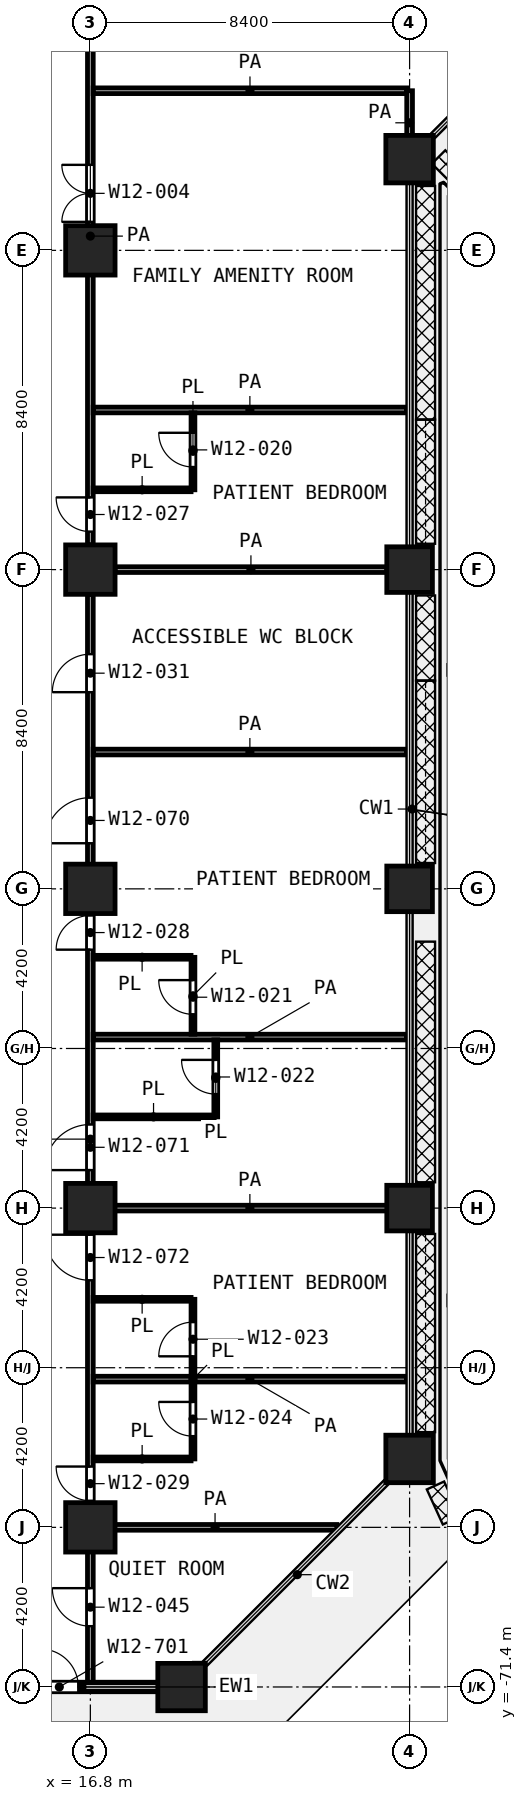
"""IFC4 building model, lengths in metres.
Left out: names, types, materials, properties, quantities, classifications, styles, units other than length and angle.
Written with IfcOpenShell. Run it as: python <this file> out.ifc"""

import sys

from ifc_helpers import new_model, si_unit, direction, frame, frame_2d, origin, origin_2d, place, context, subcontext, project, spatial, rectangle, extrude, element, fill, save


model = new_model("IFC4")
c1 = context("Model", 3, precision=1e-05, world=origin(), true_north=direction((0.0, 1.0)))
c2 = subcontext(c1, "Body", "Model", "MODEL_VIEW")
j1 = project(units=[si_unit("LENGTHUNIT", "METRE"), si_unit("PLANEANGLEUNIT", "RADIAN")], contexts=[c1])
p1 = place(None, origin())
s1 = spatial("IfcSite", under=j1, at=p1, CompositionType="ELEMENT")
p2 = place(p1, origin())
s2 = spatial("IfcBuilding", under=s1, at=p2, CompositionType="ELEMENT")
p3 = place(p2, frame((0.0, 0.0, 77.0)))
s3 = spatial("IfcBuildingStorey", under=s2, at=p3, CompositionType="ELEMENT", Elevation=77.0)
p4 = place(p3, frame((25.2, -31.2, 0.0), z_axis=(0.0, 0.0, 1.0), x_axis=(1.0, 0.0, 0.0)))
e1 = element("IfcColumn", 1, at=p4, inside=s3, PredefinedType="COLUMN", context=c2, shape_type="SweptSolid", body=[
    extrude(rectangle(XDim=1.25, YDim=1.25, at=origin_2d()), origin(), (0.0, 0.0, 1.0), 4.2),
])
for number, where, z_axis, x_axis in (
    (2, (16.8, -33.6, 0.0), (0.0, 0.0, 1.0), (1.0, 0.0, 0.0)),
    (3, (16.8, -42.0, 0.0), (0.0, 0.0, 1.0), (1.0, 0.0, 0.0)),
):
    element("IfcColumn", number, at=place(p3, frame(where, z_axis=z_axis, x_axis=x_axis)), inside=s3, PredefinedType="COLUMN", context=c2, shape_type="SweptSolid", body=[
        extrude(rectangle(XDim=1.3, YDim=1.3, at=origin_2d()), origin(), (0.0, 0.0, 1.0), 4.2),
    ])
p5 = place(p3, frame((25.2, -42.0, 0.0), z_axis=(0.0, 0.0, 1.0), x_axis=(1.0, 0.0, 0.0)))
e4 = element("IfcColumn", 4, at=p5, inside=s3, PredefinedType="COLUMN", context=c2, shape_type="SweptSolid", body=[
    extrude(rectangle(XDim=1.2, YDim=1.2, at=origin_2d()), origin(), (0.0, 0.0, 1.0), 4.2),
])
p6 = place(p3, frame((16.8, -50.4, 0.0), z_axis=(0.0, 0.0, 1.0), x_axis=(1.0, 0.0, 0.0)))
e5 = element("IfcColumn", 5, at=p6, inside=s3, PredefinedType="COLUMN", context=c2, shape_type="SweptSolid", body=[
    extrude(rectangle(XDim=1.3, YDim=1.3, at=origin_2d()), origin(), (0.0, 0.0, 1.0), 4.2),
])
p7 = place(p3, frame((25.2, -50.4, 0.0), z_axis=(0.0, 0.0, 1.0), x_axis=(1.0, 0.0, 0.0)))
e6 = element("IfcColumn", 6, at=p7, inside=s3, PredefinedType="COLUMN", context=c2, shape_type="SweptSolid", body=[
    extrude(rectangle(XDim=1.2, YDim=1.2, at=origin_2d()), origin(), (0.0, 0.0, 1.0), 4.2),
])
p8 = place(p3, frame((16.8, -58.8, 0.0), z_axis=(0.0, 0.0, 1.0), x_axis=(1.0, 0.0, 0.0)))
e7 = element("IfcColumn", 7, at=p8, inside=s3, PredefinedType="COLUMN", context=c2, shape_type="SweptSolid", body=[
    extrude(rectangle(XDim=1.3, YDim=1.3, at=origin_2d()), origin(), (0.0, 0.0, 1.0), 4.2),
])
p9 = place(p3, frame((25.2, -58.8, 0.0), z_axis=(0.0, 0.0, 1.0), x_axis=(1.0, 0.0, 0.0)))
e8 = element("IfcColumn", 8, at=p9, inside=s3, PredefinedType="COLUMN", context=c2, shape_type="SweptSolid", body=[
    extrude(rectangle(XDim=1.2, YDim=1.2, at=origin_2d()), origin(), (0.0, 0.0, 1.0), 4.2),
])
p10 = place(p3, frame((25.2, -65.4, 0.0), z_axis=(0.0, 0.0, 1.0), x_axis=(1.0, 0.0, 0.0)))
e9 = element("IfcColumn", 9, at=p10, inside=s3, PredefinedType="COLUMN", context=c2, shape_type="SweptSolid", body=[
    extrude(rectangle(XDim=1.25, YDim=1.25, at=origin_2d()), origin(), (0.0, 0.0, 1.0), 4.2),
])
p11 = place(p3, frame((16.8, -67.2, 0.0), z_axis=(0.0, 0.0, 1.0), x_axis=(1.0, 0.0, 0.0)))
e10 = element("IfcColumn", 10, at=p11, inside=s3, PredefinedType="COLUMN", context=c2, shape_type="SweptSolid", body=[
    extrude(rectangle(XDim=1.3, YDim=1.3, at=origin_2d()), origin(), (0.0, 0.0, 1.0), 4.2),
])
p12 = place(p3, frame((19.2, -71.4, 0.0), z_axis=(0.0, 0.0, 1.0), x_axis=(1.0, 0.0, 0.0)))
e11 = element("IfcColumn", 11, at=p12, inside=s3, PredefinedType="COLUMN", context=c2, shape_type="SweptSolid", body=[
    extrude(rectangle(XDim=1.25, YDim=1.25, at=origin_2d()), origin(), (0.0, 0.0, 1.0), 4.2),
])
p13 = place(p3, frame((14.592, -71.4, 0.0), z_axis=(0.0, 0.0, 1.0), x_axis=(1.0, 0.0, 0.0)))
e12 = element("IfcWall", 12, at=p13, inside=s3, PredefinedType="SOLIDWALL", context=c2, shape_type="SweptSolid", body=[
    extrude(rectangle(XDim=3.983, YDim=0.25, at=frame_2d((1.992, 0.0))), origin(), (0.0, 0.0, 1.0), 3.78),
])
p14 = place(p13, frame((0.892, 0.0, 0.0)))
e13 = element("IfcOpeningElement", 13, at=p14, cuts=e12, PredefinedType="OPENING", context=c2, shape_type="SweptSolid", body=[
    extrude(rectangle(XDim=1.0, YDim=2.1, at=frame_2d((0.5, 1.05))), frame((0.0, 0.135, 0.0), z_axis=(0.0, -1.0, 0.0), x_axis=(1.0, 0.0, 0.0)), (0.0, 0.0, 1.0), 0.27),
])
for number, where, z_axis, x_axis in (
    (14, (16.875, -65.4, 0.0), (0.0, 0.0, 1.0), (1.0, 0.0, 0.0)),
    (15, (16.875, -61.2, 0.0), (0.0, 0.0, 1.0), (1.0, 0.0, 0.0)),
):
    element("IfcWall", number, at=place(p3, frame(where, z_axis=z_axis, x_axis=x_axis)), inside=s3, PredefinedType="PARTITIONING", context=c2, shape_type="SweptSolid", body=[
        extrude(rectangle(XDim=2.575, YDim=0.1, at=frame_2d((1.288, 0.0))), origin(), (0.0, 0.0, 1.0), 3.9),
    ])
p15 = place(p3, frame((16.875, -56.4, 0.0), z_axis=(0.0, 0.0, 1.0), x_axis=(1.0, 0.0, 0.0)))
e16 = element("IfcWall", 16, at=p15, inside=s3, PredefinedType="PARTITIONING", context=c2, shape_type="SweptSolid", body=[
    extrude(rectangle(XDim=3.175, YDim=0.1, at=frame_2d((1.587, 0.0))), origin(), (0.0, 0.0, 1.0), 3.9),
])
p16 = place(p3, frame((16.875, -52.2, 0.0), z_axis=(0.0, 0.0, 1.0), x_axis=(1.0, 0.0, 0.0)))
e17 = element("IfcWall", 17, at=p16, inside=s3, PredefinedType="PARTITIONING", context=c2, shape_type="SweptSolid", body=[
    extrude(rectangle(XDim=2.574, YDim=0.1, at=frame_2d((1.287, 0.0))), origin(), (0.0, 0.0, 1.0), 3.9),
])
p17 = place(p3, frame((16.875, -39.9, 0.0), z_axis=(0.0, 0.0, 1.0), x_axis=(1.0, 0.0, 0.0)))
e18 = element("IfcWall", 18, at=p17, inside=s3, PredefinedType="PARTITIONING", context=c2, shape_type="SweptSolid", body=[
    extrude(rectangle(XDim=2.575, YDim=0.1, at=frame_2d((1.288, 0.0))), origin(), (0.0, 0.0, 1.0), 3.9),
])
p18 = place(p3, frame((19.5, -65.4, 0.0), z_axis=(0.0, 0.0, 1.0), x_axis=(0.0, 1.0, 0.0)))
e19 = element("IfcWall", 19, at=p18, inside=s3, PredefinedType="PARTITIONING", context=c2, shape_type="SweptSolid", body=[
    extrude(rectangle(XDim=4.2, YDim=0.1, at=frame_2d((2.1, 0.0))), origin(), (0.0, 0.0, 1.0), 3.9),
])
p19 = place(p18, frame((2.7, 0.0, 0.0)))
e20 = element("IfcOpeningElement", 20, at=p19, cuts=e19, PredefinedType="OPENING", context=c2, shape_type="SweptSolid", body=[
    extrude(rectangle(XDim=0.9, YDim=2.1, at=frame_2d((0.45, 1.05))), frame((0.0, 0.06, 0.0), z_axis=(0.0, -1.0, 0.0), x_axis=(1.0, 0.0, 0.0)), (0.0, 0.0, 1.0), 0.12),
])
p20 = place(p18, frame((0.6, 0.0, 0.0)))
e21 = element("IfcOpeningElement", 21, at=p20, cuts=e19, PredefinedType="OPENING", context=c2, shape_type="SweptSolid", body=[
    extrude(rectangle(XDim=0.9, YDim=2.1, at=frame_2d((0.45, 1.05))), frame((0.0, 0.06, 0.0), z_axis=(0.0, -1.0, 0.0), x_axis=(1.0, 0.0, 0.0)), (0.0, 0.0, 1.0), 0.12),
])
p21 = place(p3, frame((19.5, -54.225, 0.0), z_axis=(0.0, 0.0, 1.0), x_axis=(0.0, 1.0, 0.0)))
e22 = element("IfcWall", 22, at=p21, inside=s3, PredefinedType="PARTITIONING", context=c2, shape_type="SweptSolid", body=[
    extrude(rectangle(XDim=2.023, YDim=0.1, at=frame_2d((1.012, 0.0))), origin(), (0.0, 0.0, 1.0), 3.9),
])
p22 = place(p21, frame((0.524, 0.0, 0.0)))
e23 = element("IfcOpeningElement", 23, at=p22, cuts=e22, PredefinedType="OPENING", context=c2, shape_type="SweptSolid", body=[
    extrude(rectangle(XDim=0.9, YDim=2.1, at=frame_2d((0.45, 1.05))), frame((0.0, 0.06, 0.0), z_axis=(0.0, -1.0, 0.0), x_axis=(1.0, 0.0, 0.0)), (0.0, 0.0, 1.0), 0.12),
])
p23 = place(p3, frame((19.5, -39.9, 0.0), z_axis=(0.0, 0.0, 1.0), x_axis=(0.0, 1.0, 0.0)))
e24 = element("IfcWall", 24, at=p23, inside=s3, PredefinedType="PARTITIONING", context=c2, shape_type="SweptSolid", body=[
    extrude(rectangle(XDim=2.025, YDim=0.1, at=frame_2d((1.012, 0.0))), origin(), (0.0, 0.0, 1.0), 3.9),
])
p24 = place(p23, frame((0.6, 0.0, 0.0)))
e25 = element("IfcOpeningElement", 25, at=p24, cuts=e24, PredefinedType="OPENING", context=c2, shape_type="SweptSolid", body=[
    extrude(rectangle(XDim=0.9, YDim=2.1, at=frame_2d((0.45, 1.05))), frame((0.0, 0.06, 0.0), z_axis=(0.0, -1.0, 0.0), x_axis=(1.0, 0.0, 0.0)), (0.0, 0.0, 1.0), 0.12),
])
p25 = place(p3, frame((20.1, -56.4, 0.0), z_axis=(0.0, 0.0, 1.0), x_axis=(0.0, 1.0, 0.0)))
e26 = element("IfcWall", 26, at=p25, inside=s3, PredefinedType="PARTITIONING", context=c2, shape_type="SweptSolid", body=[
    extrude(rectangle(XDim=2.025, YDim=0.1, at=frame_2d((1.012, 0.0))), origin(), (0.0, 0.0, 1.0), 3.9),
])
p26 = place(p25, frame((0.6, 0.0, 0.0)))
e27 = element("IfcOpeningElement", 27, at=p26, cuts=e26, PredefinedType="OPENING", context=c2, shape_type="SweptSolid", body=[
    extrude(rectangle(XDim=0.9, YDim=2.1, at=frame_2d((0.45, 1.05))), frame((0.0, 0.06, 0.0), z_axis=(0.0, -1.0, 0.0), x_axis=(1.0, 0.0, 0.0)), (0.0, 0.0, 1.0), 0.12),
])
p27 = place(p3, frame((16.875, -67.2, 0.0), z_axis=(0.0, 0.0, 1.0), x_axis=(1.0, 0.0, 0.0)))
e28 = element("IfcWall", 28, at=p27, inside=s3, PredefinedType="PARTITIONING", context=c2, shape_type="SweptSolid", body=[
    extrude(rectangle(XDim=6.412, YDim=0.15, at=frame_2d((3.206, 0.0))), origin(), (0.0, 0.0, 1.0), 3.9),
])
for number, where, z_axis, x_axis in (
    (29, (16.875, -63.3, 0.0), (0.0, 0.0, 1.0), (1.0, 0.0, 0.0)),
    (30, (16.875, -58.8, 0.0), (0.0, 0.0, 1.0), (1.0, 0.0, 0.0)),
    (31, (16.875, -54.3, 0.0), (0.0, 0.0, 1.0), (1.0, 0.0, 0.0)),
    (32, (16.875, -46.8, 0.0), (0.0, 0.0, 1.0), (1.0, 0.0, 0.0)),
):
    element("IfcWall", number, at=place(p3, frame(where, z_axis=z_axis, x_axis=x_axis)), inside=s3, PredefinedType="PARTITIONING", context=c2, shape_type="SweptSolid", body=[
        extrude(rectangle(XDim=8.245, YDim=0.15, at=frame_2d((4.123, 0.0))), origin(), (0.0, 0.0, 1.0), 3.9),
    ])
p28 = place(p3, frame((17.45, -42.0, 0.0), z_axis=(0.0, 0.0, 1.0), x_axis=(1.0, 0.0, 0.0)))
e33 = element("IfcWall", 33, at=p28, inside=s3, PredefinedType="PARTITIONING", context=c2, shape_type="SweptSolid", body=[
    extrude(rectangle(XDim=7.15, YDim=0.15, at=frame_2d((3.575, 0.0))), origin(), (0.0, 0.0, 1.0), 3.9),
])
p29 = place(p3, frame((16.875, -37.8, 0.0), z_axis=(0.0, 0.0, 1.0), x_axis=(1.0, 0.0, 0.0)))
e34 = element("IfcWall", 34, at=p29, inside=s3, PredefinedType="PARTITIONING", context=c2, shape_type="SweptSolid", body=[
    extrude(rectangle(XDim=8.245, YDim=0.15, at=frame_2d((4.123, 0.0))), origin(), (0.0, 0.0, 1.0), 3.9),
])
p30 = place(p3, frame((16.875, -29.4, 0.0), z_axis=(0.0, 0.0, 1.0), x_axis=(1.0, 0.0, 0.0)))
e35 = element("IfcWall", 35, at=p30, inside=s3, PredefinedType="PARTITIONING", context=c2, shape_type="SweptSolid", body=[
    extrude(rectangle(XDim=8.25, YDim=0.15, at=frame_2d((4.125, 0.0))), origin(), (0.0, 0.0, 1.0), 3.9),
])
p31 = place(p3, frame((16.8, -71.32, 0.0), z_axis=(0.0, 0.0, 1.0), x_axis=(0.0, 1.0, 0.0)))
e36 = element("IfcWall", 36, at=p31, inside=s3, PredefinedType="PARTITIONING", context=c2, shape_type="SweptSolid", body=[
    extrude(rectangle(XDim=28.67, YDim=0.15, at=frame_2d((14.335, 0.0))), origin(), (0.0, 0.0, 1.0), 3.9),
])
p32 = place(p31, frame((26.095, 0.0, 0.0)))
e37 = element("IfcOpeningElement", 37, at=p32, cuts=e36, PredefinedType="OPENING", context=c2, shape_type="SweptSolid", body=[
    extrude(rectangle(XDim=1.0, YDim=2.1, at=frame_2d((0.5, 1.05))), frame((0.0, 0.085, 0.0), z_axis=(0.0, -1.0, 0.0), x_axis=(1.0, 0.0, 0.0)), (0.0, 0.0, 1.0), 0.17),
])
p33 = place(p31, frame((22.12, 0.0, 0.0)))
e38 = element("IfcOpeningElement", 38, at=p33, cuts=e36, PredefinedType="OPENING", context=c2, shape_type="SweptSolid", body=[
    extrude(rectangle(XDim=1.2, YDim=2.1, at=frame_2d((0.6, 1.05))), frame((0.0, 0.085, 0.0), z_axis=(0.0, -1.0, 0.0), x_axis=(1.0, 0.0, 0.0)), (0.0, 0.0, 1.0), 0.17),
])
p34 = place(p31, frame((19.32, 0.0, 0.0)))
e39 = element("IfcOpeningElement", 39, at=p34, cuts=e36, PredefinedType="OPENING", context=c2, shape_type="SweptSolid", body=[
    extrude(rectangle(XDim=0.9, YDim=2.1, at=frame_2d((0.45, 1.05))), frame((0.0, 0.085, 0.0), z_axis=(0.0, -1.0, 0.0), x_axis=(1.0, 0.0, 0.0)), (0.0, 0.0, 1.0), 0.17),
])
p35 = place(p31, frame((13.52, 0.0, 0.0)))
e40 = element("IfcOpeningElement", 40, at=p35, cuts=e36, PredefinedType="OPENING", context=c2, shape_type="SweptSolid", body=[
    extrude(rectangle(XDim=1.2, YDim=2.1, at=frame_2d((0.6, 1.05))), frame((0.0, 0.085, 0.0), z_axis=(0.0, -1.0, 0.0), x_axis=(1.0, 0.0, 0.0)), (0.0, 0.0, 1.0), 0.17),
])
p36 = place(p31, frame((10.62, 0.0, 0.0)))
e41 = element("IfcOpeningElement", 41, at=p36, cuts=e36, PredefinedType="OPENING", context=c2, shape_type="SweptSolid", body=[
    extrude(rectangle(XDim=1.2, YDim=2.1, at=frame_2d((0.6, 1.05))), frame((0.0, 0.085, 0.0), z_axis=(0.0, -1.0, 0.0), x_axis=(1.0, 0.0, 0.0)), (0.0, 0.0, 1.0), 0.17),
])
p37 = place(p31, frame((4.82, 0.0, 0.0)))
e42 = element("IfcOpeningElement", 42, at=p37, cuts=e36, PredefinedType="OPENING", context=c2, shape_type="SweptSolid", body=[
    extrude(rectangle(XDim=0.9, YDim=2.1, at=frame_2d((0.45, 1.05))), frame((0.0, 0.085, 0.0), z_axis=(0.0, -1.0, 0.0), x_axis=(1.0, 0.0, 0.0)), (0.0, 0.0, 1.0), 0.17),
])
p38 = place(p31, frame((1.52, 0.0, 0.0)))
e43 = element("IfcOpeningElement", 43, at=p38, cuts=e36, PredefinedType="OPENING", context=c2, shape_type="SweptSolid", body=[
    extrude(rectangle(XDim=1.0, YDim=2.1, at=frame_2d((0.5, 1.05))), frame((0.0, 0.085, 0.0), z_axis=(0.0, -1.0, 0.0), x_axis=(1.0, 0.0, 0.0)), (0.0, 0.0, 1.0), 0.17),
])
p39 = place(p3, frame((16.8, -41.35, 0.0), z_axis=(0.0, 0.0, 1.0), x_axis=(0.0, 1.0, 0.0)))
e44 = element("IfcWall", 44, at=p39, inside=s3, PredefinedType="PARTITIONING", context=c2, shape_type="SweptSolid", body=[
    extrude(rectangle(XDim=16.25, YDim=0.15, at=frame_2d((8.125, 0.0))), origin(), (0.0, 0.0, 1.0), 3.9),
])
p40 = place(p39, frame((8.5, 0.0, 0.0)))
e45 = element("IfcOpeningElement", 45, at=p40, cuts=e44, PredefinedType="OPENING", context=c2, shape_type="SweptSolid", body=[
    extrude(rectangle(XDim=1.5, YDim=2.1, at=frame_2d((0.75, 1.05))), frame((0.0, 0.085, 0.0), z_axis=(0.0, -1.0, 0.0), x_axis=(1.0, 0.0, 0.0)), (0.0, 0.0, 1.0), 0.17),
])
p41 = place(p39, frame((0.35, 0.0, 0.0)))
e46 = element("IfcOpeningElement", 46, at=p41, cuts=e44, PredefinedType="OPENING", context=c2, shape_type="SweptSolid", body=[
    extrude(rectangle(XDim=0.9, YDim=2.1, at=frame_2d((0.45, 1.05))), frame((0.0, 0.085, 0.0), z_axis=(0.0, -1.0, 0.0), x_axis=(1.0, 0.0, 0.0)), (0.0, 0.0, 1.0), 0.17),
])
p42 = place(p3, frame((25.2, -31.087, 0.0), z_axis=(0.0, 0.0, 1.0), x_axis=(0.0, 1.0, 0.0)))
e47 = element("IfcWall", 47, at=p42, inside=s3, PredefinedType="PARTITIONING", context=c2, shape_type="SweptSolid", body=[
    extrude(rectangle(XDim=1.687, YDim=0.15, at=frame_2d((0.844, 0.0))), origin(), (0.0, 0.0, 1.0), 3.9),
])
p43 = place(p14, origin())
e48 = element("IfcDoor", 48, at=p43, inside=s3, OperationType="SINGLE_SWING_LEFT", PredefinedType="DOOR", context=c2, shape_type="SweptSolid", body=[
    extrude(rectangle(XDim=1.0, YDim=2.1, at=frame_2d((0.5, 1.05))), frame((0.0, 0.025, 0.0), z_axis=(0.0, -1.0, 0.0), x_axis=(1.0, 0.0, 0.0)), (0.0, 0.0, 1.0), 0.05),
])
fill(e13, e48)
p44 = place(p40, origin())
e49 = element("IfcDoor", 49, at=p44, inside=s3, OperationType="DOUBLE_DOOR_SINGLE_SWING", PredefinedType="DOOR", context=c2, shape_type="SweptSolid", body=[
    extrude(rectangle(XDim=1.5, YDim=2.1, at=frame_2d((0.75, 1.05))), frame((0.0, 0.025, 0.0), z_axis=(0.0, -1.0, 0.0), x_axis=(1.0, 0.0, 0.0)), (0.0, 0.0, 1.0), 0.05),
])
fill(e45, e49)
p45 = place(p41, origin())
e50 = element("IfcDoor", 50, at=p45, inside=s3, OperationType="SINGLE_SWING_RIGHT", PredefinedType="DOOR", context=c2, shape_type="SweptSolid", body=[
    extrude(rectangle(XDim=0.9, YDim=2.1, at=frame_2d((0.45, 1.05))), frame((0.0, 0.025, 0.0), z_axis=(0.0, -1.0, 0.0), x_axis=(1.0, 0.0, 0.0)), (0.0, 0.0, 1.0), 0.05),
])
fill(e46, e50)
p46 = place(p24, origin())
e51 = element("IfcDoor", 51, at=p46, inside=s3, OperationType="SINGLE_SWING_RIGHT", PredefinedType="DOOR", context=c2, shape_type="SweptSolid", body=[
    extrude(rectangle(XDim=0.9, YDim=2.1, at=frame_2d((0.45, 1.05))), frame((0.0, 0.025, 0.0), z_axis=(0.0, -1.0, 0.0), x_axis=(1.0, 0.0, 0.0)), (0.0, 0.0, 1.0), 0.05),
])
fill(e25, e51)
p47 = place(p32, origin())
e52 = element("IfcDoor", 52, at=p47, inside=s3, OperationType="SINGLE_SWING_LEFT", PredefinedType="DOOR", context=c2, shape_type="SweptSolid", body=[
    extrude(rectangle(XDim=1.0, YDim=2.1, at=frame_2d((0.5, 1.05))), frame((0.0, 0.025, 0.0), z_axis=(0.0, -1.0, 0.0), x_axis=(1.0, 0.0, 0.0)), (0.0, 0.0, 1.0), 0.05),
])
fill(e37, e52)
p48 = place(p33, origin())
e53 = element("IfcDoor", 53, at=p48, inside=s3, OperationType="SINGLE_SWING_LEFT", PredefinedType="DOOR", context=c2, shape_type="SweptSolid", body=[
    extrude(rectangle(XDim=1.2, YDim=2.1, at=frame_2d((0.6, 1.05))), frame((0.0, 0.025, 0.0), z_axis=(0.0, -1.0, 0.0), x_axis=(1.0, 0.0, 0.0)), (0.0, 0.0, 1.0), 0.05),
])
fill(e38, e53)
p49 = place(p34, origin())
e54 = element("IfcDoor", 54, at=p49, inside=s3, OperationType="SINGLE_SWING_LEFT", PredefinedType="DOOR", context=c2, shape_type="SweptSolid", body=[
    extrude(rectangle(XDim=0.9, YDim=2.1, at=frame_2d((0.45, 1.05))), frame((0.0, 0.025, 0.0), z_axis=(0.0, -1.0, 0.0), x_axis=(1.0, 0.0, 0.0)), (0.0, 0.0, 1.0), 0.05),
])
fill(e39, e54)
p50 = place(p22, origin())
e55 = element("IfcDoor", 55, at=p50, inside=s3, OperationType="SINGLE_SWING_RIGHT", PredefinedType="DOOR", context=c2, shape_type="SweptSolid", body=[
    extrude(rectangle(XDim=0.9, YDim=2.1, at=frame_2d((0.45, 1.05))), frame((0.0, 0.025, 0.0), z_axis=(0.0, -1.0, 0.0), x_axis=(1.0, 0.0, 0.0)), (0.0, 0.0, 1.0), 0.05),
])
fill(e23, e55)
p51 = place(p35, origin())
e56 = element("IfcDoor", 56, at=p51, inside=s3, OperationType="SINGLE_SWING_LEFT", PredefinedType="DOOR", context=c2, shape_type="SweptSolid", body=[
    extrude(rectangle(XDim=1.2, YDim=2.1, at=frame_2d((0.6, 1.05))), frame((0.0, 0.025, 0.0), z_axis=(0.0, -1.0, 0.0), x_axis=(1.0, 0.0, 0.0)), (0.0, 0.0, 1.0), 0.05),
])
fill(e40, e56)
p52 = place(p26, origin())
e57 = element("IfcDoor", 57, at=p52, inside=s3, OperationType="SINGLE_SWING_RIGHT", PredefinedType="DOOR", context=c2, shape_type="SweptSolid", body=[
    extrude(rectangle(XDim=0.9, YDim=2.1, at=frame_2d((0.45, 1.05))), frame((0.0, 0.025, 0.0), z_axis=(0.0, -1.0, 0.0), x_axis=(1.0, 0.0, 0.0)), (0.0, 0.0, 1.0), 0.05),
])
fill(e27, e57)
p53 = place(p36, origin())
e58 = element("IfcDoor", 58, at=p53, inside=s3, OperationType="SINGLE_SWING_RIGHT", PredefinedType="DOOR", context=c2, shape_type="SweptSolid", body=[
    extrude(rectangle(XDim=1.2, YDim=2.1, at=frame_2d((0.6, 1.05))), frame((0.0, 0.025, 0.0), z_axis=(0.0, -1.0, 0.0), x_axis=(1.0, 0.0, 0.0)), (0.0, 0.0, 1.0), 0.05),
])
fill(e41, e58)
p54 = place(p19, origin())
e59 = element("IfcDoor", 59, at=p54, inside=s3, OperationType="SINGLE_SWING_LEFT", PredefinedType="DOOR", context=c2, shape_type="SweptSolid", body=[
    extrude(rectangle(XDim=0.9, YDim=2.1, at=frame_2d((0.45, 1.05))), frame((0.0, 0.025, 0.0), z_axis=(0.0, -1.0, 0.0), x_axis=(1.0, 0.0, 0.0)), (0.0, 0.0, 1.0), 0.05),
])
fill(e20, e59)
p55 = place(p37, origin())
e60 = element("IfcDoor", 60, at=p55, inside=s3, OperationType="SINGLE_SWING_RIGHT", PredefinedType="DOOR", context=c2, shape_type="SweptSolid", body=[
    extrude(rectangle(XDim=0.9, YDim=2.1, at=frame_2d((0.45, 1.05))), frame((0.0, 0.025, 0.0), z_axis=(0.0, -1.0, 0.0), x_axis=(1.0, 0.0, 0.0)), (0.0, 0.0, 1.0), 0.05),
])
fill(e42, e60)
p56 = place(p20, origin())
e61 = element("IfcDoor", 61, at=p56, inside=s3, OperationType="SINGLE_SWING_RIGHT", PredefinedType="DOOR", context=c2, shape_type="SweptSolid", body=[
    extrude(rectangle(XDim=0.9, YDim=2.1, at=frame_2d((0.45, 1.05))), frame((0.0, 0.025, 0.0), z_axis=(0.0, -1.0, 0.0), x_axis=(1.0, 0.0, 0.0)), (0.0, 0.0, 1.0), 0.05),
])
fill(e21, e61)
p57 = place(p38, origin())
e62 = element("IfcDoor", 62, at=p57, inside=s3, OperationType="SINGLE_SWING_RIGHT", PredefinedType="DOOR", context=c2, shape_type="SweptSolid", body=[
    extrude(rectangle(XDim=1.0, YDim=2.1, at=frame_2d((0.5, 1.05))), frame((0.0, 0.025, 0.0), z_axis=(0.0, -1.0, 0.0), x_axis=(1.0, 0.0, 0.0)), (0.0, 0.0, 1.0), 0.05),
])
fill(e43, e62)
save(model, sys.argv[1])
